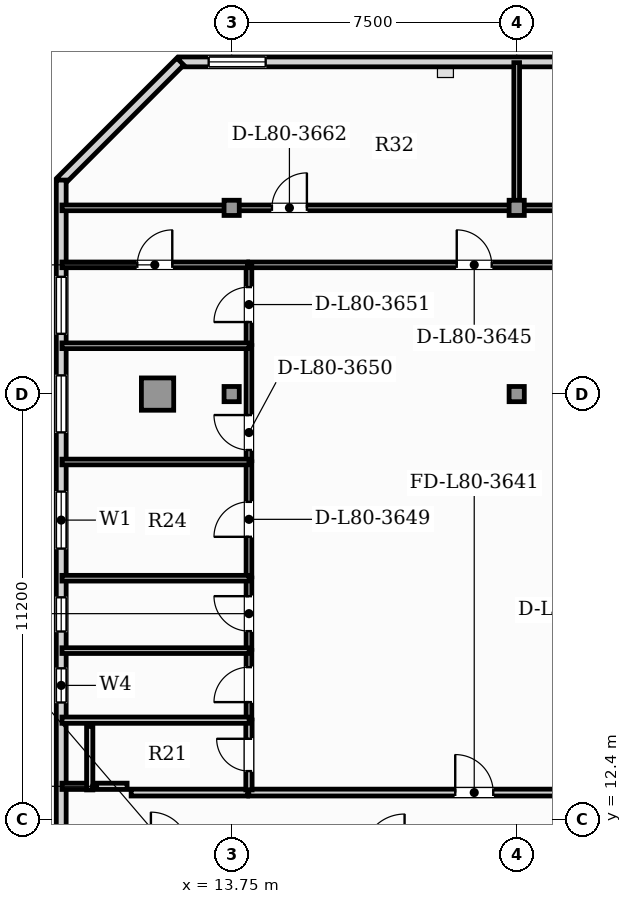
"""IFC4 building model, lengths in metres.
Left out: names, types, materials, properties, quantities, classifications, styles, units other than length and angle.
Written with IfcOpenShell. Run it as: python <this file> out.ifc"""

import sys

from ifc_helpers import new_model, si_unit, direction, frame, frame_2d, origin, origin_2d, place, context, subcontext, project, spatial, rectangle, hollow_rectangle, extrude, element, fill, save


model = new_model("IFC4")
c1 = context("Model", 3, precision=1e-05, world=origin(), true_north=direction((0.0, 1.0)))
c2 = subcontext(c1, "Body", "Model", "MODEL_VIEW")
j1 = project(units=[si_unit("LENGTHUNIT", "METRE"), si_unit("PLANEANGLEUNIT", "RADIAN")], contexts=[c1])
p1 = place(None, origin())
s1 = spatial("IfcSite", under=j1, at=p1, CompositionType="ELEMENT")
p2 = place(p1, origin())
s2 = spatial("IfcBuilding", under=s1, at=p2, CompositionType="ELEMENT")
p3 = place(p2, frame((0.0, 0.0, 324.6)))
s3 = spatial("IfcBuildingStorey", under=s2, at=p3, CompositionType="ELEMENT", Elevation=324.6)
p4 = place(p3, frame((11.8, 23.6, 0.0), z_axis=(0.0, 0.0, 1.0), x_axis=(1.0, 0.0, 0.0)))
e1 = element("IfcColumn", 1, at=p4, inside=s3, PredefinedType="USERDEFINED", context=c2, shape_type="SweptSolid", body=[
    extrude(hollow_rectangle(XDim=0.85, YDim=0.85, WallThickness=0.05, at=origin_2d()), origin(), (0.0, 0.0, 1.0), 3.85),
])
for number, where, z_axis, x_axis in (
    (2, (13.75, 23.6, 0.0), (0.0, 0.0, 1.0), (1.0, 0.0, 0.0)),
    (3, (21.25, 23.6, 0.0), (0.0, 0.0, 1.0), (1.0, 0.0, 0.0)),
    (4, (13.75, 28.5, 0.0), (0.0, 0.0, 1.0), (1.0, 0.0, 0.0)),
    (5, (21.25, 28.5, 0.0), (0.0, 0.0, 1.0), (1.0, 0.0, 0.0)),
):
    element("IfcColumn", number, at=place(p3, frame(where, z_axis=z_axis, x_axis=x_axis)), inside=s3, PredefinedType="COLUMN", context=c2, shape_type="SweptSolid", body=[
        extrude(hollow_rectangle(XDim=0.4, YDim=0.4, WallThickness=0.02, at=origin_2d()), origin(), (0.0, 0.0, 1.0), 3.85),
    ])
p5 = place(p3, frame((45.125, 32.341, 0.0), z_axis=(0.0, 0.0, 1.0), x_axis=(-1.0, 0.0, 0.0)))
e6 = element("IfcWall", 6, at=p5, inside=s3, PredefinedType="SOLIDWALL", context=c2, shape_type="SweptSolid", body=[
    extrude(rectangle(XDim=32.75, YDim=0.26, at=frame_2d((16.375, 0.0))), origin(), (0.0, 0.0, 1.0), 3.65),
])
p6 = place(p5, frame((30.479, 0.0, 0.9)))
e7 = element("IfcOpeningElement", 7, at=p6, cuts=e6, PredefinedType="OPENING", context=c2, shape_type="SweptSolid", body=[
    extrude(rectangle(XDim=1.5, YDim=1.95, at=frame_2d((0.75, 0.975))), frame((0.0, 0.14, 0.0), z_axis=(0.0, -1.0, 0.0), x_axis=(1.0, 0.0, 0.0)), (0.0, 0.0, 1.0), 0.28),
])
p7 = place(p5, frame((18.707, 0.0, 0.9)))
e8 = element("IfcOpeningElement", 8, at=p7, cuts=e6, PredefinedType="OPENING", context=c2, shape_type="SweptSolid", body=[
    extrude(rectangle(XDim=1.5, YDim=1.95, at=frame_2d((0.75, 0.975))), frame((0.0, 0.14, 0.0), z_axis=(0.0, -1.0, 0.0), x_axis=(1.0, 0.0, 0.0)), (0.0, 0.0, 1.0), 0.28),
])
p8 = place(p5, frame((10.16, 0.0, 0.9)))
e9 = element("IfcOpeningElement", 9, at=p8, cuts=e6, PredefinedType="OPENING", context=c2, shape_type="SweptSolid", body=[
    extrude(rectangle(XDim=1.5, YDim=1.95, at=frame_2d((0.75, 0.975))), frame((0.0, 0.14, 0.0), z_axis=(0.0, -1.0, 0.0), x_axis=(1.0, 0.0, 0.0)), (0.0, 0.0, 1.0), 0.28),
])
p9 = place(p3, frame((12.399, 32.35, 0.0), z_axis=(0.0, 0.0, 1.0), x_axis=(-0.707106781187, -0.707106781187, 0.0)))
e10 = element("IfcWall", 10, at=p9, inside=s3, PredefinedType="SOLIDWALL", context=c2, shape_type="SweptSolid", body=[
    extrude(rectangle(XDim=4.445, YDim=0.26, at=frame_2d((2.223, 0.0))), origin(), (0.0, 0.0, 1.0), 3.65),
])
p10 = place(p3, frame((9.265, 29.231, 0.0), z_axis=(0.0, 0.0, 1.0), x_axis=(0.0, -1.0, 0.0)))
e11 = element("IfcWall", 11, at=p10, inside=s3, PredefinedType="SOLIDWALL", context=c2, shape_type="SweptSolid", body=[
    extrude(rectangle(XDim=25.991, YDim=0.26, at=frame_2d((12.995, 0.0))), origin(), (0.0, 0.0, 1.0), 3.65),
])
p11 = place(p10, frame((24.311, 0.0, 0.95)))
e12 = element("IfcOpeningElement", 12, at=p11, cuts=e11, PredefinedType="OPENING", context=c2, shape_type="SweptSolid", body=[
    extrude(rectangle(XDim=0.9, YDim=1.5, at=frame_2d((0.45, 0.75))), frame((0.0, 0.14, 0.0), z_axis=(0.0, -1.0, 0.0), x_axis=(1.0, 0.0, 0.0)), (0.0, 0.0, 1.0), 0.28),
])
p12 = place(p10, frame((12.846, 0.0, 0.95)))
e13 = element("IfcOpeningElement", 13, at=p12, cuts=e11, PredefinedType="OPENING", context=c2, shape_type="SweptSolid", body=[
    extrude(rectangle(XDim=0.9, YDim=1.5, at=frame_2d((0.45, 0.75))), frame((0.0, 0.14, 0.0), z_axis=(0.0, -1.0, 0.0), x_axis=(1.0, 0.0, 0.0)), (0.0, 0.0, 1.0), 0.28),
])
p13 = place(p10, frame((10.978, 0.0, 0.95)))
e14 = element("IfcOpeningElement", 14, at=p13, cuts=e11, PredefinedType="OPENING", context=c2, shape_type="SweptSolid", body=[
    extrude(rectangle(XDim=0.9, YDim=1.5, at=frame_2d((0.45, 0.75))), frame((0.0, 0.14, 0.0), z_axis=(0.0, -1.0, 0.0), x_axis=(1.0, 0.0, 0.0)), (0.0, 0.0, 1.0), 0.28),
])
p14 = place(p10, frame((8.196, 0.0, 0.9)))
e15 = element("IfcOpeningElement", 15, at=p14, cuts=e11, PredefinedType="OPENING", context=c2, shape_type="SweptSolid", body=[
    extrude(rectangle(XDim=1.5, YDim=1.95, at=frame_2d((0.75, 0.975))), frame((0.0, 0.14, 0.0), z_axis=(0.0, -1.0, 0.0), x_axis=(1.0, 0.0, 0.0)), (0.0, 0.0, 1.0), 0.28),
])
p15 = place(p10, frame((5.138, 0.0, 0.9)))
e16 = element("IfcOpeningElement", 16, at=p15, cuts=e11, PredefinedType="OPENING", context=c2, shape_type="SweptSolid", body=[
    extrude(rectangle(XDim=1.5, YDim=1.95, at=frame_2d((0.75, 0.975))), frame((0.0, 0.14, 0.0), z_axis=(0.0, -1.0, 0.0), x_axis=(1.0, 0.0, 0.0)), (0.0, 0.0, 1.0), 0.28),
])
p16 = place(p10, frame((2.545, 0.0, 0.9)))
e17 = element("IfcOpeningElement", 17, at=p16, cuts=e11, PredefinedType="OPENING", context=c2, shape_type="SweptSolid", body=[
    extrude(rectangle(XDim=1.5, YDim=1.95, at=frame_2d((0.75, 0.975))), frame((0.0, 0.14, 0.0), z_axis=(0.0, -1.0, 0.0), x_axis=(1.0, 0.0, 0.0)), (0.0, 0.0, 1.0), 0.28),
])
p17 = place(p3, frame((14.2, 13.115, 0.0), z_axis=(0.0, 0.0, 1.0), x_axis=(1.0, 0.0, 0.0)))
e18 = element("IfcWall", 18, at=p17, inside=s3, PredefinedType="PARTITIONING", context=c2, shape_type="SweptSolid", body=[
    extrude(rectangle(XDim=11.865, YDim=0.18, at=frame_2d((5.932, 0.0))), origin(), (0.0, 0.0, 1.0), 3.65),
])
p18 = place(p17, frame((5.432, 0.0, 0.0)))
e19 = element("IfcOpeningElement", 19, at=p18, cuts=e18, PredefinedType="OPENING", context=c2, shape_type="SweptSolid", body=[
    extrude(rectangle(XDim=1.0, YDim=2.15, at=frame_2d((0.5, 1.075))), frame((0.0, 0.1, 0.0), z_axis=(0.0, -1.0, 0.0), x_axis=(1.0, 0.0, 0.0)), (0.0, 0.0, 1.0), 0.2),
])
p19 = place(p3, frame((11.105, 13.115, 0.0), z_axis=(0.0, 0.0, 1.0), x_axis=(1.0, 0.0, 0.0)))
e20 = element("IfcWall", 20, at=p19, inside=s3, PredefinedType="PARTITIONING", context=c2, shape_type="SweptSolid", body=[
    extrude(rectangle(XDim=3.065, YDim=0.18, at=frame_2d((1.533, 0.0))), origin(), (0.0, 0.0, 1.0), 3.65),
])
p20 = place(p3, frame((14.2, 27.0, 0.0), z_axis=(0.0, 0.0, 1.0), x_axis=(1.0, 0.0, 0.0)))
e21 = element("IfcWall", 21, at=p20, inside=s3, PredefinedType="PARTITIONING", context=c2, shape_type="SweptSolid", body=[
    extrude(rectangle(XDim=11.865, YDim=0.15, at=frame_2d((5.932, 0.0))), origin(), (0.0, 0.0, 1.0), 3.65),
])
p21 = place(p20, frame((5.472, 0.0, 0.0)))
e22 = element("IfcOpeningElement", 22, at=p21, cuts=e21, PredefinedType="OPENING", context=c2, shape_type="SweptSolid", body=[
    extrude(rectangle(XDim=0.92, YDim=2.1, at=frame_2d((0.46, 1.05))), frame((0.0, 0.085, 0.0), z_axis=(0.0, -1.0, 0.0), x_axis=(1.0, 0.0, 0.0)), (0.0, 0.0, 1.0), 0.17),
])
p22 = place(p3, frame((14.205, 13.185, 0.0), z_axis=(0.0, 0.0, 1.0), x_axis=(0.0, 1.0, 0.0)))
e23 = element("IfcWall", 23, at=p22, inside=s3, PredefinedType="PLUMBINGWALL", context=c2, shape_type="SweptSolid", body=[
    extrude(rectangle(XDim=1.84, YDim=0.165, at=frame_2d((0.92, 0.0))), origin(), (0.0, 0.0, 1.0), 3.65),
])
p23 = place(p22, frame((0.495, 0.0, 0.0)))
e24 = element("IfcOpeningElement", 24, at=p23, cuts=e23, PredefinedType="OPENING", context=c2, shape_type="SweptSolid", body=[
    extrude(rectangle(XDim=0.85, YDim=2.1, at=frame_2d((0.425, 1.05))), frame((0.0, 0.093, 0.0), z_axis=(0.0, -1.0, 0.0), x_axis=(1.0, 0.0, 0.0)), (0.0, 0.0, 1.0), 0.185),
])
p24 = place(p3, frame((14.205, 15.055, 0.0), z_axis=(0.0, 0.0, 1.0), x_axis=(0.0, 1.0, 0.0)))
e25 = element("IfcWall", 25, at=p24, inside=s3, PredefinedType="PARTITIONING", context=c2, shape_type="SweptSolid", body=[
    extrude(rectangle(XDim=1.8, YDim=0.15, at=frame_2d((0.9, 0.0))), origin(), (0.0, 0.0, 1.0), 3.65),
])
p25 = place(p24, frame((0.44, 0.0, 0.0)))
e26 = element("IfcOpeningElement", 26, at=p25, cuts=e25, PredefinedType="OPENING", context=c2, shape_type="SweptSolid", body=[
    extrude(rectangle(XDim=0.92, YDim=2.1, at=frame_2d((0.46, 1.05))), frame((0.0, 0.085, 0.0), z_axis=(0.0, -1.0, 0.0), x_axis=(1.0, 0.0, 0.0)), (0.0, 0.0, 1.0), 0.17),
])
p26 = place(p3, frame((14.205, 16.885, 0.0), z_axis=(0.0, 0.0, 1.0), x_axis=(0.0, 1.0, 0.0)))
e27 = element("IfcWall", 27, at=p26, inside=s3, PredefinedType="PARTITIONING", context=c2, shape_type="SweptSolid", body=[
    extrude(rectangle(XDim=1.875, YDim=0.15, at=frame_2d((0.938, 0.0))), origin(), (0.0, 0.0, 1.0), 3.65),
])
p27 = place(p26, frame((0.478, 0.0, 0.0)))
e28 = element("IfcOpeningElement", 28, at=p27, cuts=e27, PredefinedType="OPENING", context=c2, shape_type="SweptSolid", body=[
    extrude(rectangle(XDim=0.92, YDim=2.1, at=frame_2d((0.46, 1.05))), frame((0.0, 0.085, 0.0), z_axis=(0.0, -1.0, 0.0), x_axis=(1.0, 0.0, 0.0)), (0.0, 0.0, 1.0), 0.17),
])
p28 = place(p3, frame((14.205, 18.79, 0.0), z_axis=(0.0, 0.0, 1.0), x_axis=(0.0, 1.0, 0.0)))
e29 = element("IfcWall", 29, at=p28, inside=s3, PredefinedType="PARTITIONING", context=c2, shape_type="SweptSolid", body=[
    extrude(rectangle(XDim=3.028, YDim=0.15, at=frame_2d((1.514, 0.0))), origin(), (0.0, 0.0, 1.0), 3.65),
])
p29 = place(p28, frame((1.054, 0.0, 0.0)))
e30 = element("IfcOpeningElement", 30, at=p29, cuts=e29, PredefinedType="OPENING", context=c2, shape_type="SweptSolid", body=[
    extrude(rectangle(XDim=0.92, YDim=2.1, at=frame_2d((0.46, 1.05))), frame((0.0, 0.085, 0.0), z_axis=(0.0, -1.0, 0.0), x_axis=(1.0, 0.0, 0.0)), (0.0, 0.0, 1.0), 0.17),
])
p30 = place(p3, frame((14.205, 21.848, 0.0), z_axis=(0.0, 0.0, 1.0), x_axis=(0.0, 1.0, 0.0)))
e31 = element("IfcWall", 31, at=p30, inside=s3, PredefinedType="PARTITIONING", context=c2, shape_type="SweptSolid", body=[
    extrude(rectangle(XDim=3.028, YDim=0.15, at=frame_2d((1.514, 0.0))), origin(), (0.0, 0.0, 1.0), 3.65),
])
p31 = place(p30, frame((0.28, 0.0, 0.0)))
e32 = element("IfcOpeningElement", 32, at=p31, cuts=e31, PredefinedType="OPENING", context=c2, shape_type="SweptSolid", body=[
    extrude(rectangle(XDim=0.92, YDim=2.1, at=frame_2d((0.46, 1.05))), frame((0.0, 0.085, 0.0), z_axis=(0.0, -1.0, 0.0), x_axis=(1.0, 0.0, 0.0)), (0.0, 0.0, 1.0), 0.17),
])
p32 = place(p3, frame((14.205, 24.906, 0.0), z_axis=(0.0, 0.0, 1.0), x_axis=(0.0, 1.0, 0.0)))
e33 = element("IfcWall", 33, at=p32, inside=s3, PredefinedType="PARTITIONING", context=c2, shape_type="SweptSolid", body=[
    extrude(rectangle(XDim=2.099, YDim=0.15, at=frame_2d((1.049, 0.0))), origin(), (0.0, 0.0, 1.0), 3.65),
])
p33 = place(p32, frame((0.589, 0.0, 0.0)))
e34 = element("IfcOpeningElement", 34, at=p33, cuts=e33, PredefinedType="OPENING", context=c2, shape_type="SweptSolid", body=[
    extrude(rectangle(XDim=0.92, YDim=2.1, at=frame_2d((0.46, 1.05))), frame((0.0, 0.085, 0.0), z_axis=(0.0, -1.0, 0.0), x_axis=(1.0, 0.0, 0.0)), (0.0, 0.0, 1.0), 0.17),
])
p34 = place(p3, frame((9.285, 27.0, 0.0), z_axis=(0.0, 0.0, 1.0), x_axis=(1.0, 0.0, 0.0)))
e35 = element("IfcWall", 35, at=p34, inside=s3, PredefinedType="PARTITIONING", context=c2, shape_type="SweptSolid", body=[
    extrude(rectangle(XDim=4.885, YDim=0.15, at=frame_2d((2.443, 0.0))), origin(), (0.0, 0.0, 1.0), 3.65),
])
p35 = place(p34, frame((1.983, 0.0, 0.0)))
e36 = element("IfcOpeningElement", 36, at=p35, cuts=e35, PredefinedType="OPENING", context=c2, shape_type="SweptSolid", body=[
    extrude(rectangle(XDim=0.92, YDim=2.1, at=frame_2d((0.46, 1.05))), frame((0.0, 0.085, 0.0), z_axis=(0.0, -1.0, 0.0), x_axis=(1.0, 0.0, 0.0)), (0.0, 0.0, 1.0), 0.17),
])
p36 = place(p3, frame((9.285, 28.5, 0.0), z_axis=(0.0, 0.0, 1.0), x_axis=(1.0, 0.0, 0.0)))
e37 = element("IfcWall", 37, at=p36, inside=s3, PredefinedType="PARTITIONING", context=c2, shape_type="SweptSolid", body=[
    extrude(rectangle(XDim=11.97, YDim=0.15, at=frame_2d((5.985, 0.0))), origin(), (0.0, 0.0, 1.0), 3.117),
])
p37 = place(p36, frame((5.525, 0.0, 0.0)))
e38 = element("IfcOpeningElement", 38, at=p37, cuts=e37, PredefinedType="OPENING", context=c2, shape_type="SweptSolid", body=[
    extrude(rectangle(XDim=0.92, YDim=2.1, at=frame_2d((0.46, 1.05))), frame((0.0, 0.085, 0.0), z_axis=(0.0, -1.0, 0.0), x_axis=(1.0, 0.0, 0.0)), (0.0, 0.0, 1.0), 0.17),
])
p38 = place(p3, frame((21.285, 28.5, 0.0), z_axis=(0.0, 0.0, 1.0), x_axis=(1.0, 0.0, 0.0)))
e39 = element("IfcWall", 39, at=p38, inside=s3, PredefinedType="PARTITIONING", context=c2, shape_type="SweptSolid", body=[
    extrude(rectangle(XDim=8.805, YDim=0.15, at=frame_2d((4.403, 0.0))), origin(), (0.0, 0.0, 1.0), 3.117),
])
p39 = place(p38, frame((3.943, 0.0, 0.0)))
e40 = element("IfcOpeningElement", 40, at=p39, cuts=e39, PredefinedType="OPENING", context=c2, shape_type="SweptSolid", body=[
    extrude(rectangle(XDim=0.92, YDim=2.1, at=frame_2d((0.46, 1.05))), frame((0.0, 0.085, 0.0), z_axis=(0.0, -1.0, 0.0), x_axis=(1.0, 0.0, 0.0)), (0.0, 0.0, 1.0), 0.17),
])
p40 = place(p3, frame((9.285, 15.02, 0.0), z_axis=(0.0, 0.0, 1.0), x_axis=(1.0, 0.0, 0.0)))
e41 = element("IfcWall", 41, at=p40, inside=s3, PredefinedType="PLUMBINGWALL", context=c2, shape_type="SweptSolid", body=[
    extrude(rectangle(XDim=4.926, YDim=0.165, at=frame_2d((2.463, 0.0))), origin(), (0.0, 0.0, 1.0), 3.65),
])
for number, where, z_axis, x_axis in (
    (42, (9.285, 16.85, 0.0), (0.0, 0.0, 1.0), (1.0, 0.0, 0.0)),
    (43, (9.285, 18.755, 0.0), (0.0, 0.0, 1.0), (1.0, 0.0, 0.0)),
    (44, (9.285, 21.813, 0.0), (0.0, 0.0, 1.0), (1.0, 0.0, 0.0)),
    (45, (9.285, 24.871, 0.0), (0.0, 0.0, 1.0), (1.0, 0.0, 0.0)),
):
    element("IfcWall", number, at=place(p3, frame(where, z_axis=z_axis, x_axis=x_axis)), inside=s3, PredefinedType="PARTITIONING", context=c2, shape_type="SweptSolid", body=[
        extrude(rectangle(XDim=4.926, YDim=0.15, at=frame_2d((2.463, 0.0))), origin(), (0.0, 0.0, 1.0), 3.65),
    ])
p41 = place(p3, frame((21.25, 28.495, 0.0), z_axis=(0.0, 0.0, 1.0), x_axis=(0.0, 1.0, 0.0)))
e46 = element("IfcWall", 46, at=p41, inside=s3, PredefinedType="PARTITIONING", context=c2, shape_type="SweptSolid", body=[
    extrude(rectangle(XDim=3.826, YDim=0.15, at=frame_2d((1.913, 0.0))), origin(), (0.0, 0.0, 1.0), 3.65),
])
p42 = place(p3, frame((10.999, 13.28, 0.0), z_axis=(0.0, 0.0, 1.0), x_axis=(-1.0, 0.0, 0.0)))
e47 = element("IfcWall", 47, at=p42, inside=s3, PredefinedType="PLUMBINGWALL", context=c2, shape_type="SweptSolid", body=[
    extrude(rectangle(XDim=1.714, YDim=0.165, at=frame_2d((0.857, 0.0))), origin(), (0.0, 0.0, 1.0), 3.65),
])
p43 = place(p3, frame((10.015, 13.185, 0.0), z_axis=(0.0, 0.0, 1.0), x_axis=(0.0, 1.0, 0.0)))
e48 = element("IfcWall", 48, at=p43, inside=s3, PredefinedType="PLUMBINGWALL", context=c2, shape_type="SweptSolid", body=[
    extrude(rectangle(XDim=1.67, YDim=0.165, at=frame_2d((0.835, 0.0))), origin(), (0.0, 0.0, 1.0), 3.65),
])
p44 = place(p12, origin())
e49 = element("IfcWindow", 49, at=p44, inside=s3, PartitioningType="SINGLE_PANEL", PredefinedType="WINDOW", context=c2, shape_type="SweptSolid", body=[
    extrude(rectangle(XDim=0.9, YDim=1.5, at=frame_2d((0.45, 0.75))), frame((0.0, 0.03, 0.0), z_axis=(0.0, -1.0, 0.0), x_axis=(1.0, 0.0, 0.0)), (0.0, 0.0, 1.0), 0.06),
])
fill(e13, e49)
p45 = place(p13, origin())
e50 = element("IfcWindow", 50, at=p45, inside=s3, PartitioningType="SINGLE_PANEL", PredefinedType="WINDOW", context=c2, shape_type="SweptSolid", body=[
    extrude(rectangle(XDim=0.9, YDim=1.5, at=frame_2d((0.45, 0.75))), frame((0.0, 0.03, 0.0), z_axis=(0.0, -1.0, 0.0), x_axis=(1.0, 0.0, 0.0)), (0.0, 0.0, 1.0), 0.06),
])
fill(e14, e50)
p46 = place(p14, origin())
e51 = element("IfcWindow", 51, at=p46, inside=s3, PartitioningType="SINGLE_PANEL", PredefinedType="WINDOW", context=c2, shape_type="SweptSolid", body=[
    extrude(rectangle(XDim=1.5, YDim=1.95, at=frame_2d((0.75, 0.975))), frame((0.0, 0.03, 0.0), z_axis=(0.0, -1.0, 0.0), x_axis=(1.0, 0.0, 0.0)), (0.0, 0.0, 1.0), 0.06),
])
fill(e15, e51)
p47 = place(p15, origin())
e52 = element("IfcWindow", 52, at=p47, inside=s3, PartitioningType="SINGLE_PANEL", PredefinedType="WINDOW", context=c2, shape_type="SweptSolid", body=[
    extrude(rectangle(XDim=1.5, YDim=1.95, at=frame_2d((0.75, 0.975))), frame((0.0, 0.03, 0.0), z_axis=(0.0, -1.0, 0.0), x_axis=(1.0, 0.0, 0.0)), (0.0, 0.0, 1.0), 0.06),
])
fill(e16, e52)
p48 = place(p16, origin())
e53 = element("IfcWindow", 53, at=p48, inside=s3, PartitioningType="SINGLE_PANEL", PredefinedType="WINDOW", context=c2, shape_type="SweptSolid", body=[
    extrude(rectangle(XDim=1.5, YDim=1.95, at=frame_2d((0.75, 0.975))), frame((0.0, 0.03, 0.0), z_axis=(0.0, -1.0, 0.0), x_axis=(1.0, 0.0, 0.0)), (0.0, 0.0, 1.0), 0.06),
])
fill(e17, e53)
p49 = place(p6, origin())
e54 = element("IfcWindow", 54, at=p49, inside=s3, PartitioningType="SINGLE_PANEL", PredefinedType="WINDOW", context=c2, shape_type="SweptSolid", body=[
    extrude(rectangle(XDim=1.5, YDim=1.95, at=frame_2d((0.75, 0.975))), frame((0.0, 0.03, 0.0), z_axis=(0.0, -1.0, 0.0), x_axis=(1.0, 0.0, 0.0)), (0.0, 0.0, 1.0), 0.06),
])
fill(e7, e54)
p50 = place(p18, origin())
e55 = element("IfcDoor", 55, at=p50, inside=s3, OperationType="SINGLE_SWING_LEFT", PredefinedType="DOOR", context=c2, shape_type="SweptSolid", body=[
    extrude(rectangle(XDim=1.0, YDim=2.15, at=frame_2d((0.5, 1.075))), frame((0.0, 0.025, 0.0), z_axis=(0.0, -1.0, 0.0), x_axis=(1.0, 0.0, 0.0)), (0.0, 0.0, 1.0), 0.05),
])
fill(e19, e55)
p51 = place(p21, origin())
e56 = element("IfcDoor", 56, at=p51, inside=s3, OperationType="SINGLE_SWING_LEFT", PredefinedType="DOOR", context=c2, shape_type="SweptSolid", body=[
    extrude(rectangle(XDim=0.92, YDim=2.1, at=frame_2d((0.46, 1.05))), frame((0.0, 0.025, 0.0), z_axis=(0.0, -1.0, 0.0), x_axis=(1.0, 0.0, 0.0)), (0.0, 0.0, 1.0), 0.05),
])
fill(e22, e56)
p52 = place(p23, origin())
e57 = element("IfcDoor", 57, at=p52, inside=s3, OperationType="SINGLE_SWING_RIGHT", PredefinedType="DOOR", context=c2, shape_type="SweptSolid", body=[
    extrude(rectangle(XDim=0.85, YDim=2.1, at=frame_2d((0.425, 1.05))), frame((0.0, 0.025, 0.0), z_axis=(0.0, -1.0, 0.0), x_axis=(1.0, 0.0, 0.0)), (0.0, 0.0, 1.0), 0.05),
])
fill(e24, e57)
p53 = place(p25, origin())
e58 = element("IfcDoor", 58, at=p53, inside=s3, OperationType="SINGLE_SWING_LEFT", PredefinedType="DOOR", context=c2, shape_type="SweptSolid", body=[
    extrude(rectangle(XDim=0.92, YDim=2.1, at=frame_2d((0.46, 1.05))), frame((0.0, 0.025, 0.0), z_axis=(0.0, -1.0, 0.0), x_axis=(1.0, 0.0, 0.0)), (0.0, 0.0, 1.0), 0.05),
])
fill(e26, e58)
p54 = place(p27, origin())
e59 = element("IfcDoor", 59, at=p54, inside=s3, OperationType="SINGLE_SWING_RIGHT", PredefinedType="DOOR", context=c2, shape_type="SweptSolid", body=[
    extrude(rectangle(XDim=0.92, YDim=2.1, at=frame_2d((0.46, 1.05))), frame((0.0, 0.025, 0.0), z_axis=(0.0, -1.0, 0.0), x_axis=(1.0, 0.0, 0.0)), (0.0, 0.0, 1.0), 0.05),
])
fill(e28, e59)
p55 = place(p29, origin())
e60 = element("IfcDoor", 60, at=p55, inside=s3, OperationType="SINGLE_SWING_LEFT", PredefinedType="DOOR", context=c2, shape_type="SweptSolid", body=[
    extrude(rectangle(XDim=0.92, YDim=2.1, at=frame_2d((0.46, 1.05))), frame((0.0, 0.025, 0.0), z_axis=(0.0, -1.0, 0.0), x_axis=(1.0, 0.0, 0.0)), (0.0, 0.0, 1.0), 0.05),
])
fill(e30, e60)
p56 = place(p31, origin())
e61 = element("IfcDoor", 61, at=p56, inside=s3, OperationType="SINGLE_SWING_RIGHT", PredefinedType="DOOR", context=c2, shape_type="SweptSolid", body=[
    extrude(rectangle(XDim=0.92, YDim=2.1, at=frame_2d((0.46, 1.05))), frame((0.0, 0.025, 0.0), z_axis=(0.0, -1.0, 0.0), x_axis=(1.0, 0.0, 0.0)), (0.0, 0.0, 1.0), 0.05),
])
fill(e32, e61)
p57 = place(p33, origin())
e62 = element("IfcDoor", 62, at=p57, inside=s3, OperationType="SINGLE_SWING_LEFT", PredefinedType="DOOR", context=c2, shape_type="SweptSolid", body=[
    extrude(rectangle(XDim=0.92, YDim=2.1, at=frame_2d((0.46, 1.05))), frame((0.0, 0.025, 0.0), z_axis=(0.0, -1.0, 0.0), x_axis=(1.0, 0.0, 0.0)), (0.0, 0.0, 1.0), 0.05),
])
fill(e34, e62)
p58 = place(p35, origin())
e63 = element("IfcDoor", 63, at=p58, inside=s3, OperationType="SINGLE_SWING_RIGHT", PredefinedType="DOOR", context=c2, shape_type="SweptSolid", body=[
    extrude(rectangle(XDim=0.92, YDim=2.1, at=frame_2d((0.46, 1.05))), frame((0.0, 0.025, 0.0), z_axis=(0.0, -1.0, 0.0), x_axis=(1.0, 0.0, 0.0)), (0.0, 0.0, 1.0), 0.05),
])
fill(e36, e63)
p59 = place(p37, origin())
e64 = element("IfcDoor", 64, at=p59, inside=s3, OperationType="SINGLE_SWING_RIGHT", PredefinedType="DOOR", context=c2, shape_type="SweptSolid", body=[
    extrude(rectangle(XDim=0.92, YDim=2.1, at=frame_2d((0.46, 1.05))), frame((0.0, 0.025, 0.0), z_axis=(0.0, -1.0, 0.0), x_axis=(1.0, 0.0, 0.0)), (0.0, 0.0, 1.0), 0.05),
])
fill(e38, e64)
save(model, sys.argv[1])
